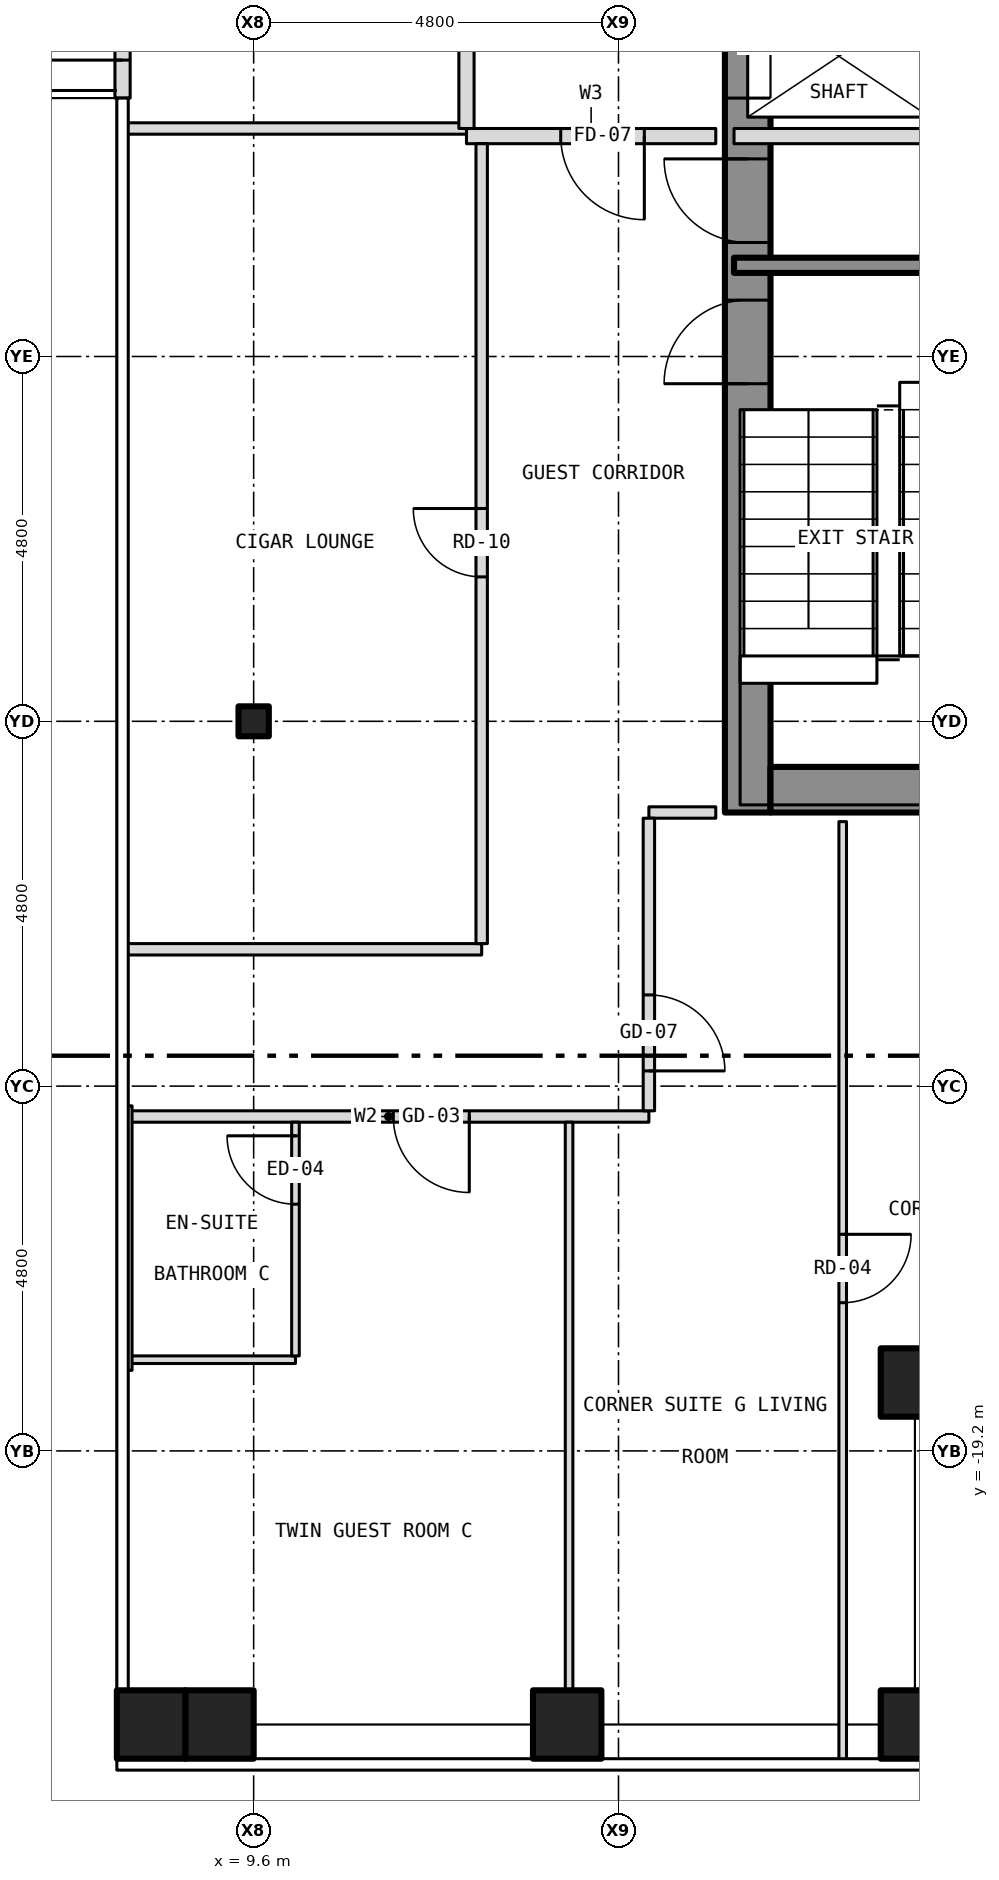
"""IFC4 building model, lengths in metres.
Left out: names, types, materials, properties, quantities, classifications, styles, units other than length and angle.
Written with IfcOpenShell. Run it as: python <this file> out.ifc"""

import sys

from ifc_helpers import new_model, si_unit, direction, frame, frame_2d, origin, origin_2d, place, context, subcontext, project, spatial, rectangle, hollow_rectangle, i_section, extrude, element, fill, save


model = new_model("IFC4")
c1 = context("Model", 3, precision=1e-05, world=origin(), true_north=direction((0.0, 1.0)))
c2 = subcontext(c1, "Body", "Model", "MODEL_VIEW")
j1 = project(units=[si_unit("LENGTHUNIT", "METRE"), si_unit("PLANEANGLEUNIT", "RADIAN")], contexts=[c1])
p1 = place(None, origin())
s1 = spatial("IfcSite", under=j1, at=p1, CompositionType="ELEMENT")
p2 = place(p1, origin())
s2 = spatial("IfcBuilding", under=s1, at=p2, CompositionType="ELEMENT")
p3 = place(p2, frame((0.0, 0.0, 124.0)))
s3 = spatial("IfcBuildingStorey", under=s2, at=p3, CompositionType="ELEMENT", Elevation=124.0)
for number, where, z_axis, x_axis in (
    (1, (9.15, -22.8, -0.15), (0.0, 0.0, 1.0), (1.0, 0.0, 0.0)),
    (2, (13.725, -22.8, -0.15), (0.0, 0.0, 1.0), (1.0, 0.0, 0.0)),
    (3, (18.3, -22.8, -0.15), (0.0, 0.0, 1.0), (1.0, 0.0, 0.0)),
    (4, (18.3, -18.3, -0.15), (0.0, 0.0, 1.0), (1.0, 0.0, 0.0)),
    (5, (8.25, -22.8, -0.15), (0.0, 0.0, 1.0), (1.0, 0.0, 0.0)),
):
    element("IfcColumn", number, at=place(p3, frame(where, z_axis=z_axis, x_axis=x_axis)), inside=s3, PredefinedType="COLUMN", context=c2, shape_type="SweptSolid", body=[
        extrude(hollow_rectangle(XDim=0.9, YDim=0.9, WallThickness=0.05, at=origin_2d()), origin(), (0.0, 0.0, 1.0), 3.5),
    ])
p4 = place(p3, frame((9.6, -9.6, -0.15), z_axis=(0.0, 0.0, 1.0), x_axis=(1.0, 0.0, 0.0)))
e6 = element("IfcColumn", 6, at=p4, inside=s3, PredefinedType="COLUMN", context=c2, shape_type="SweptSolid", body=[
    extrude(i_section(OverallWidth=0.399, OverallDepth=0.394, WebThickness=0.023, FlangeThickness=0.037, at=origin_2d()), origin(), (0.0, 0.0, 1.0), 3.5),
])
p5 = place(p3, frame((16.1, -10.8, 0.0), z_axis=(0.0, 0.0, 1.0), x_axis=(0.0, 1.0, 0.0)))
e7 = element("IfcWall", 7, at=p5, inside=s3, PredefinedType="SHEAR", context=c2, shape_type="SweptSolid", body=[
    extrude(rectangle(XDim=21.6, YDim=0.6, at=frame_2d((10.8, 0.0))), origin(), (0.0, 0.0, 1.0), 3.25),
])
p6 = place(p5, frame((9.4, 0.0, 0.0)))
e8 = element("IfcOpeningElement", 8, at=p6, cuts=e7, PredefinedType="OPENING", context=c2, shape_type="SweptSolid", body=[
    extrude(rectangle(XDim=1.1, YDim=2.1, at=frame_2d((0.55, 1.05))), frame((0.0, 0.312, 0.0), z_axis=(0.0, -1.0, 0.0), x_axis=(1.0, 0.0, 0.0)), (0.0, 0.0, 1.0), 0.624),
])
p7 = place(p5, frame((11.5, 0.0, 0.0)))
e9 = element("IfcOpeningElement", 9, at=p7, cuts=e7, PredefinedType="OPENING", context=c2, shape_type="SweptSolid", body=[
    extrude(rectangle(XDim=1.1, YDim=2.1, at=frame_2d((0.55, 1.05))), frame((0.0, 0.312, 0.0), z_axis=(0.0, -1.0, 0.0), x_axis=(1.0, 0.0, 0.0)), (0.0, 0.0, 1.0), 0.624),
])
p8 = place(p5, frame((13.6, 0.0, 0.0)))
e10 = element("IfcOpeningElement", 10, at=p8, cuts=e7, PredefinedType="OPENING", context=c2, shape_type="SweptSolid", body=[
    extrude(rectangle(XDim=1.1, YDim=2.1, at=frame_2d((0.55, 1.05))), frame((0.0, 0.312, 0.0), z_axis=(0.0, -1.0, 0.0), x_axis=(1.0, 0.0, 0.0)), (0.0, 0.0, 1.0), 0.624),
])
p9 = place(p5, frame((15.7, 0.0, 0.0)))
e11 = element("IfcOpeningElement", 11, at=p9, cuts=e7, PredefinedType="OPENING", context=c2, shape_type="SweptSolid", body=[
    extrude(rectangle(XDim=1.1, YDim=2.1, at=frame_2d((0.55, 1.05))), frame((0.0, 0.312, 0.0), z_axis=(0.0, -1.0, 0.0), x_axis=(1.0, 0.0, 0.0)), (0.0, 0.0, 1.0), 0.624),
])
p10 = place(p5, frame((17.8, 0.0, 0.0)))
e12 = element("IfcOpeningElement", 12, at=p10, cuts=e7, PredefinedType="OPENING", context=c2, shape_type="SweptSolid", body=[
    extrude(rectangle(XDim=1.1, YDim=2.1, at=frame_2d((0.55, 1.05))), frame((0.0, 0.312, 0.0), z_axis=(0.0, -1.0, 0.0), x_axis=(1.0, 0.0, 0.0)), (0.0, 0.0, 1.0), 0.624),
])
p11 = place(p5, frame((5.642, 0.0, 0.0)))
e13 = element("IfcOpeningElement", 13, at=p11, cuts=e7, PredefinedType="OPENING", context=c2, shape_type="SweptSolid", body=[
    extrude(rectangle(XDim=1.1, YDim=2.1, at=frame_2d((0.55, 1.05))), frame((0.0, 0.312, 0.0), z_axis=(0.0, -1.0, 0.0), x_axis=(1.0, 0.0, 0.0)), (0.0, 0.0, 1.0), 0.624),
])
p12 = place(p5, frame((7.5, 0.0, 0.0)))
e14 = element("IfcOpeningElement", 14, at=p12, cuts=e7, PredefinedType="OPENING", context=c2, shape_type="SweptSolid", body=[
    extrude(rectangle(XDim=1.1, YDim=2.1, at=frame_2d((0.55, 1.05))), frame((0.0, 0.312, 0.0), z_axis=(0.0, -1.0, 0.0), x_axis=(1.0, 0.0, 0.0)), (0.0, 0.0, 1.0), 0.624),
])
p13 = place(p3, frame((16.4, -10.5, 0.0), z_axis=(0.0, 0.0, 1.0), x_axis=(1.0, 0.0, 0.0)))
e15 = element("IfcWall", 15, at=p13, inside=s3, PredefinedType="SHEAR", context=c2, shape_type="SweptSolid", body=[
    extrude(rectangle(XDim=5.8, YDim=0.6, at=frame_2d((2.9, 0.0))), origin(), (0.0, 0.0, 1.0), 3.25),
])
p14 = place(p3, frame((7.875, -1.4, 0.0), z_axis=(0.0, 0.0, 1.0), x_axis=(0.0, 1.0, 0.0)))
e16 = element("IfcWall", 16, at=p14, inside=s3, PredefinedType="SOLIDWALL", context=c2, shape_type="SweptSolid", body=[
    extrude(rectangle(XDim=2.8, YDim=0.2, at=frame_2d((1.4, 0.0))), origin(), (0.0, 0.0, 1.0), 3.5),
])
p15 = place(p14, frame((0.5, 0.0, 0.0)))
e17 = element("IfcOpeningElement", 17, at=p15, cuts=e16, PredefinedType="OPENING", context=c2, shape_type="SweptSolid", body=[
    extrude(rectangle(XDim=1.8, YDim=2.1, at=frame_2d((0.9, 1.05))), frame((0.0, 0.112, 0.0), z_axis=(0.0, -1.0, 0.0), x_axis=(1.0, 0.0, 0.0)), (0.0, 0.0, 1.0), 0.224),
])
p16 = place(p3, frame((7.95, -18.0, 0.0), z_axis=(0.0, 0.0, 1.0), x_axis=(1.0, 0.0, 0.0)))
e18 = element("IfcWall", 18, at=p16, inside=s3, PredefinedType="PARTITIONING", context=c2, shape_type="SweptSolid", body=[
    extrude(rectangle(XDim=2.2, YDim=0.1, at=frame_2d((1.1, 0.0))), origin(), (0.0, 0.0, 1.0), 3.35),
])
p17 = place(p3, frame((7.95, -14.8, 0.0), z_axis=(0.0, 0.0, 1.0), x_axis=(1.0, 0.0, 0.0)))
e19 = element("IfcWall", 19, at=p17, inside=s3, PredefinedType="PARTITIONING", context=c2, shape_type="SweptSolid", body=[
    extrude(rectangle(XDim=6.85, YDim=0.15, at=frame_2d((3.425, 0.0))), origin(), (0.0, 0.0, 1.0), 3.35),
])
p18 = place(p17, frame((3.487, 0.0, 0.0)))
e20 = element("IfcOpeningElement", 20, at=p18, cuts=e19, PredefinedType="OPENING", context=c2, shape_type="SweptSolid", body=[
    extrude(rectangle(XDim=1.0, YDim=2.1, at=frame_2d((0.5, 1.05))), frame((0.0, 0.087, 0.0), z_axis=(0.0, -1.0, 0.0), x_axis=(1.0, 0.0, 0.0)), (0.0, 0.0, 1.0), 0.174),
])
p19 = place(p3, frame((7.92, -12.6, 0.0), z_axis=(0.0, 0.0, 1.0), x_axis=(1.0, 0.0, 0.0)))
e21 = element("IfcWall", 21, at=p19, inside=s3, PredefinedType="PARTITIONING", context=c2, shape_type="SweptSolid", body=[
    extrude(rectangle(XDim=4.68, YDim=0.15, at=frame_2d((2.34, 0.0))), origin(), (0.0, 0.0, 1.0), 3.35),
])
p20 = place(p3, frame((14.8, -10.8, 0.0), z_axis=(0.0, 0.0, 1.0), x_axis=(1.0, 0.0, 0.0)))
e22 = element("IfcWall", 22, at=p20, inside=s3, PredefinedType="PARTITIONING", context=c2, shape_type="SweptSolid", body=[
    extrude(rectangle(XDim=0.88, YDim=0.15, at=frame_2d((0.44, 0.0))), origin(), (0.0, 0.0, 1.0), 3.35),
])
p21 = place(p3, frame((15.92, -3.6, 0.0), z_axis=(0.0, 0.0, 1.0), x_axis=(1.0, 0.0, 0.0)))
e23 = element("IfcWall", 23, at=p21, inside=s3, PredefinedType="SHEAR", context=c2, shape_type="SweptSolid", body=[
    extrude(rectangle(XDim=4.08, YDim=0.2, at=frame_2d((2.04, 0.0))), origin(), (0.0, 0.0, 1.0), 3.25),
])
p22 = place(p3, frame((12.4, -1.9, 0.0), z_axis=(0.0, 0.0, 1.0), x_axis=(1.0, 0.0, 0.0)))
e24 = element("IfcWall", 24, at=p22, inside=s3, PredefinedType="PARTITIONING", context=c2, shape_type="SweptSolid", body=[
    extrude(rectangle(XDim=3.28, YDim=0.2, at=frame_2d((1.64, 0.0))), origin(), (0.0, 0.0, 1.0), 3.35),
])
p23 = place(p22, frame((1.24, 0.0, 0.0)))
e25 = element("IfcOpeningElement", 25, at=p23, cuts=e24, PredefinedType="OPENING", context=c2, shape_type="SweptSolid", body=[
    extrude(rectangle(XDim=1.1, YDim=2.1, at=frame_2d((0.55, 1.05))), frame((0.0, 0.112, 0.0), z_axis=(0.0, -1.0, 0.0), x_axis=(1.0, 0.0, 0.0)), (0.0, 0.0, 1.0), 0.224),
])
p24 = place(p3, frame((15.92, -1.9, 0.0), z_axis=(0.0, 0.0, 1.0), x_axis=(1.0, 0.0, 0.0)))
e26 = element("IfcWall", 26, at=p24, inside=s3, PredefinedType="PARTITIONING", context=c2, shape_type="SweptSolid", body=[
    extrude(rectangle(XDim=6.76, YDim=0.2, at=frame_2d((3.38, 0.0))), origin(), (0.0, 0.0, 1.0), 3.25),
])
p25 = place(p3, frame((7.92, -1.8, 0.0), z_axis=(0.0, 0.0, 1.0), x_axis=(1.0, 0.0, 0.0)))
e27 = element("IfcWall", 27, at=p25, inside=s3, PredefinedType="PARTITIONING", context=c2, shape_type="SweptSolid", body=[
    extrude(rectangle(XDim=4.48, YDim=0.15, at=frame_2d((2.24, 0.0))), origin(), (0.0, 0.0, 1.0), 3.35),
])
p26 = place(p3, frame((7.95, -18.14, 0.0), z_axis=(0.0, 0.0, 1.0), x_axis=(0.0, 1.0, 0.0)))
e28 = element("IfcWall", 28, at=p26, inside=s3, PredefinedType="PARTITIONING", context=c2, shape_type="SweptSolid", body=[
    extrude(rectangle(XDim=3.48, YDim=0.1, at=frame_2d((1.74, 0.0))), origin(), (0.0, 0.0, 1.0), 2.733),
])
p27 = place(p3, frame((10.15, -17.95, 0.0), z_axis=(0.0, 0.0, 1.0), x_axis=(0.0, 1.0, 0.0)))
e29 = element("IfcWall", 29, at=p27, inside=s3, PredefinedType="PARTITIONING", context=c2, shape_type="SweptSolid", body=[
    extrude(rectangle(XDim=3.075, YDim=0.1, at=frame_2d((1.538, 0.0))), origin(), (0.0, 0.0, 1.0), 3.35),
])
p28 = place(p27, frame((1.996, 0.0, 0.0)))
e30 = element("IfcOpeningElement", 30, at=p28, cuts=e29, PredefinedType="OPENING", context=c2, shape_type="SweptSolid", body=[
    extrude(rectangle(XDim=0.9, YDim=2.1, at=frame_2d((0.45, 1.05))), frame((0.0, 0.062, 0.0), z_axis=(0.0, -1.0, 0.0), x_axis=(1.0, 0.0, 0.0)), (0.0, 0.0, 1.0), 0.124),
])
p29 = place(p3, frame((12.4, -1.8, 0.0), z_axis=(0.0, 0.0, 1.0), x_axis=(0.0, 1.0, 0.0)))
e31 = element("IfcWall", 31, at=p29, inside=s3, PredefinedType="PARTITIONING", context=c2, shape_type="SweptSolid", body=[
    extrude(rectangle(XDim=4.0, YDim=0.2, at=frame_2d((2.0, 0.0))), origin(), (0.0, 0.0, 1.0), 3.35),
])
p30 = place(p29, frame((1.25, 0.0, 0.0)))
e32 = element("IfcOpeningElement", 32, at=p30, cuts=e31, PredefinedType="OPENING", context=c2, shape_type="SweptSolid", body=[
    extrude(rectangle(XDim=1.1, YDim=2.1, at=frame_2d((0.55, 1.05))), frame((0.0, 0.112, 0.0), z_axis=(0.0, -1.0, 0.0), x_axis=(1.0, 0.0, 0.0)), (0.0, 0.0, 1.0), 0.224),
])
p31 = place(p3, frame((12.6, -12.525, 0.0), z_axis=(0.0, 0.0, 1.0), x_axis=(0.0, 1.0, 0.0)))
e33 = element("IfcWall", 33, at=p31, inside=s3, PredefinedType="PARTITIONING", context=c2, shape_type="SweptSolid", body=[
    extrude(rectangle(XDim=10.525, YDim=0.15, at=frame_2d((5.262, 0.0))), origin(), (0.0, 0.0, 1.0), 3.35),
])
p32 = place(p31, frame((4.825, 0.0, 0.0)))
e34 = element("IfcOpeningElement", 34, at=p32, cuts=e33, PredefinedType="OPENING", context=c2, shape_type="SweptSolid", body=[
    extrude(rectangle(XDim=0.9, YDim=2.1, at=frame_2d((0.45, 1.05))), frame((0.0, 0.087, 0.0), z_axis=(0.0, -1.0, 0.0), x_axis=(1.0, 0.0, 0.0)), (0.0, 0.0, 1.0), 0.174),
])
p33 = place(p3, frame((13.75, -22.68, 0.0), z_axis=(0.0, 0.0, 1.0), x_axis=(0.0, 1.0, 0.0)))
e35 = element("IfcWall", 35, at=p33, inside=s3, PredefinedType="PARTITIONING", context=c2, shape_type="SweptSolid", body=[
    extrude(rectangle(XDim=7.805, YDim=0.1, at=frame_2d((3.902, 0.0))), origin(), (0.0, 0.0, 1.0), 3.35),
])
p34 = place(p3, frame((14.8, -14.725, 0.0), z_axis=(0.0, 0.0, 1.0), x_axis=(0.0, 1.0, 0.0)))
e36 = element("IfcWall", 36, at=p34, inside=s3, PredefinedType="PARTITIONING", context=c2, shape_type="SweptSolid", body=[
    extrude(rectangle(XDim=3.85, YDim=0.15, at=frame_2d((1.925, 0.0))), origin(), (0.0, 0.0, 1.0), 3.35),
])
p35 = place(p34, frame((0.525, 0.0, 0.0)))
e37 = element("IfcOpeningElement", 37, at=p35, cuts=e36, PredefinedType="OPENING", context=c2, shape_type="SweptSolid", body=[
    extrude(rectangle(XDim=1.0, YDim=2.1, at=frame_2d((0.5, 1.05))), frame((0.0, 0.087, 0.0), z_axis=(0.0, -1.0, 0.0), x_axis=(1.0, 0.0, 0.0)), (0.0, 0.0, 1.0), 0.174),
])
p36 = place(p3, frame((17.35, -23.28, 0.0), z_axis=(0.0, 0.0, 1.0), x_axis=(0.0, 1.0, 0.0)))
e38 = element("IfcWall", 38, at=p36, inside=s3, PredefinedType="PARTITIONING", context=c2, shape_type="SweptSolid", body=[
    extrude(rectangle(XDim=12.36, YDim=0.1, at=frame_2d((6.18, 0.0))), origin(), (0.0, 0.0, 1.0), 3.35),
])
p37 = place(p36, frame((6.03, 0.0, 0.0)))
e39 = element("IfcOpeningElement", 39, at=p37, cuts=e38, PredefinedType="OPENING", context=c2, shape_type="SweptSolid", body=[
    extrude(rectangle(XDim=0.9, YDim=2.1, at=frame_2d((0.45, 1.05))), frame((0.0, 0.062, 0.0), z_axis=(0.0, -1.0, 0.0), x_axis=(1.0, 0.0, 0.0)), (0.0, 0.0, 1.0), 0.124),
])
p38 = place(p15, origin())
e40 = element("IfcDoor", 40, at=p38, inside=s3, OperationType="DOUBLE_DOOR_DOUBLE_SWING", PredefinedType="DOOR", context=c2, shape_type="SweptSolid", body=[
    extrude(rectangle(XDim=1.8, YDim=2.1, at=frame_2d((0.9, 1.05))), frame((0.0, 0.025, 0.0), z_axis=(0.0, -1.0, 0.0), x_axis=(1.0, 0.0, 0.0)), (0.0, 0.0, 1.0), 0.05),
])
fill(e17, e40)
p39 = place(p6, origin())
e41 = element("IfcDoor", 41, at=p39, inside=s3, OperationType="SLIDING_TO_LEFT", PredefinedType="DOOR", context=c2, shape_type="SweptSolid", body=[
    extrude(rectangle(XDim=1.1, YDim=2.1, at=frame_2d((0.55, 1.05))), frame((0.0, 0.025, 0.0), z_axis=(0.0, -1.0, 0.0), x_axis=(1.0, 0.0, 0.0)), (0.0, 0.0, 1.0), 0.05),
])
fill(e8, e41)
p40 = place(p11, origin())
e42 = element("IfcDoor", 42, at=p40, inside=s3, OperationType="SINGLE_SWING_LEFT", PredefinedType="DOOR", context=c2, shape_type="SweptSolid", body=[
    extrude(rectangle(XDim=1.1, YDim=2.1, at=frame_2d((0.55, 1.05))), frame((0.0, 0.025, 0.0), z_axis=(0.0, -1.0, 0.0), x_axis=(1.0, 0.0, 0.0)), (0.0, 0.0, 1.0), 0.05),
])
fill(e13, e42)
p41 = place(p12, origin())
e43 = element("IfcDoor", 43, at=p41, inside=s3, OperationType="SINGLE_SWING_RIGHT", PredefinedType="DOOR", context=c2, shape_type="SweptSolid", body=[
    extrude(rectangle(XDim=1.1, YDim=2.1, at=frame_2d((0.55, 1.05))), frame((0.0, 0.025, 0.0), z_axis=(0.0, -1.0, 0.0), x_axis=(1.0, 0.0, 0.0)), (0.0, 0.0, 1.0), 0.05),
])
fill(e14, e43)
p42 = place(p23, origin())
e44 = element("IfcDoor", 44, at=p42, inside=s3, OperationType="SINGLE_SWING_RIGHT", PredefinedType="DOOR", context=c2, shape_type="SweptSolid", body=[
    extrude(rectangle(XDim=1.1, YDim=2.1, at=frame_2d((0.55, 1.05))), frame((0.0, 0.025, 0.0), z_axis=(0.0, -1.0, 0.0), x_axis=(1.0, 0.0, 0.0)), (0.0, 0.0, 1.0), 0.05),
])
fill(e25, e44)
p43 = place(p18, origin())
e45 = element("IfcDoor", 45, at=p43, inside=s3, OperationType="SINGLE_SWING_RIGHT", PredefinedType="DOOR", context=c2, shape_type="SweptSolid", body=[
    extrude(rectangle(XDim=1.0, YDim=2.1, at=frame_2d((0.5, 1.05))), frame((0.0, 0.025, 0.0), z_axis=(0.0, -1.0, 0.0), x_axis=(1.0, 0.0, 0.0)), (0.0, 0.0, 1.0), 0.05),
])
fill(e20, e45)
p44 = place(p28, origin())
e46 = element("IfcDoor", 46, at=p44, inside=s3, OperationType="SINGLE_SWING_RIGHT", PredefinedType="DOOR", context=c2, shape_type="SweptSolid", body=[
    extrude(rectangle(XDim=0.9, YDim=2.1, at=frame_2d((0.45, 1.05))), frame((0.0, 0.025, 0.0), z_axis=(0.0, -1.0, 0.0), x_axis=(1.0, 0.0, 0.0)), (0.0, 0.0, 1.0), 0.05),
])
fill(e30, e46)
p45 = place(p35, origin())
e47 = element("IfcDoor", 47, at=p45, inside=s3, OperationType="SINGLE_SWING_LEFT", PredefinedType="DOOR", context=c2, shape_type="SweptSolid", body=[
    extrude(rectangle(XDim=1.0, YDim=2.1, at=frame_2d((0.5, 1.05))), frame((0.0, 0.025, 0.0), z_axis=(0.0, -1.0, 0.0), x_axis=(1.0, 0.0, 0.0)), (0.0, 0.0, 1.0), 0.05),
])
fill(e37, e47)
p46 = place(p37, origin())
e48 = element("IfcDoor", 48, at=p46, inside=s3, OperationType="SINGLE_SWING_RIGHT", PredefinedType="DOOR", context=c2, shape_type="SweptSolid", body=[
    extrude(rectangle(XDim=0.9, YDim=2.1, at=frame_2d((0.45, 1.05))), frame((0.0, 0.025, 0.0), z_axis=(0.0, -1.0, 0.0), x_axis=(1.0, 0.0, 0.0)), (0.0, 0.0, 1.0), 0.05),
])
fill(e39, e48)
p47 = place(p32, origin())
e49 = element("IfcDoor", 49, at=p47, inside=s3, OperationType="SINGLE_SWING_RIGHT", PredefinedType="DOOR", context=c2, shape_type="SweptSolid", body=[
    extrude(rectangle(XDim=0.9, YDim=2.1, at=frame_2d((0.45, 1.05))), frame((0.0, 0.025, 0.0), z_axis=(0.0, -1.0, 0.0), x_axis=(1.0, 0.0, 0.0)), (0.0, 0.0, 1.0), 0.05),
])
fill(e34, e49)
save(model, sys.argv[1])
